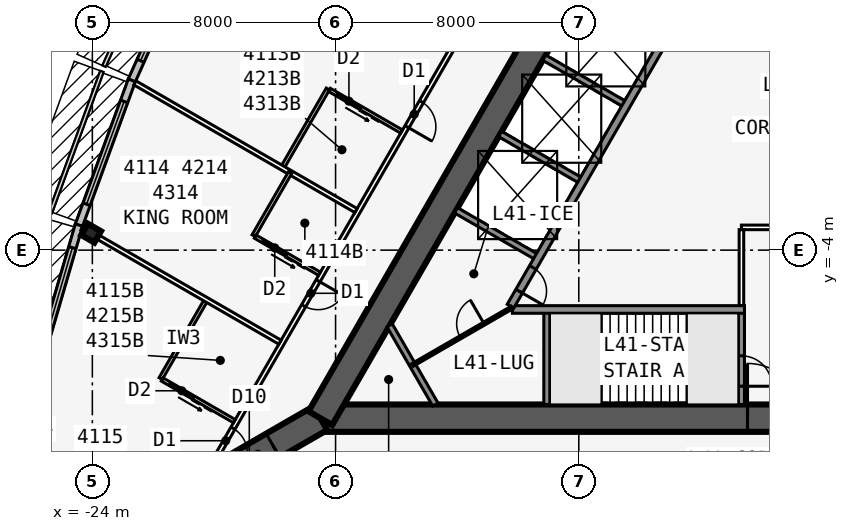
"""IFC4 building model, lengths in metres.
Left out: names, types, materials, properties, quantities, classifications, styles, units other than length and angle.
Written with IfcOpenShell. Run it as: python <this file> out.ifc"""

import sys

from ifc_helpers import new_model, si_unit, direction, frame, frame_2d, origin, origin_2d, place, context, subcontext, project, spatial, rectangle, i_section, extrude, element, fill, save


model = new_model("IFC4")
c1 = context("Model", 3, precision=1e-05, world=origin(), true_north=direction((0.0, 1.0)))
c2 = subcontext(c1, "Body", "Model", "MODEL_VIEW")
j1 = project(units=[si_unit("LENGTHUNIT", "METRE"), si_unit("PLANEANGLEUNIT", "RADIAN")], contexts=[c1])
p1 = place(None, origin())
s1 = spatial("IfcSite", under=j1, at=p1, CompositionType="ELEMENT")
p2 = place(p1, origin())
s2 = spatial("IfcBuilding", under=s1, at=p2, CompositionType="ELEMENT")
p3 = place(p2, frame((0.0, 0.0, 155.5)))
s3 = spatial("IfcBuildingStorey", under=s2, at=p3, CompositionType="ELEMENT", Elevation=155.5)
p4 = place(p3, frame((-16.5, -9.526, 0.0), z_axis=(0.0, 0.0, 1.0), x_axis=(1.0, 0.0, 0.0)))
e1 = element("IfcWall", 1, at=p4, inside=s3, PredefinedType="SHEAR", context=c2, shape_type="SweptSolid", body=[
    extrude(rectangle(XDim=33.0, YDim=0.9, at=frame_2d((16.5, 0.0))), origin(), (0.0, 0.0, 1.0), 3.4),
])
p5 = place(p4, frame((14.05, 0.0, 0.0)))
e2 = element("IfcOpeningElement", 2, at=p5, cuts=e1, PredefinedType="OPENING", context=c2, shape_type="SweptSolid", body=[
    extrude(rectangle(XDim=1.8, YDim=2.13, at=frame_2d((0.9, 1.065))), frame((0.0, 0.46, 0.0), z_axis=(0.0, -1.0, 0.0), x_axis=(1.0, 0.0, 0.0)), (0.0, 0.0, 1.0), 0.92),
])
p6 = place(p3, frame((-10.183, -5.951, 0.0), z_axis=(0.0, 0.0, 1.0), x_axis=(1.0, 0.0, 0.0)))
e3 = element("IfcWall", 3, at=p6, inside=s3, PredefinedType="SOLIDWALL", context=c2, shape_type="SweptSolid", body=[
    extrude(rectangle(XDim=7.633, YDim=0.25, at=frame_2d((3.816, 0.0))), origin(), (0.0, 0.0, 1.0), 3.235),
])
p7 = place(p3, frame((-9.05, -5.951, 0.0), z_axis=(0.0, 0.0, 1.0), x_axis=(0.0, -1.0, 0.0)))
e4 = element("IfcWall", 4, at=p7, inside=s3, PredefinedType="SOLIDWALL", context=c2, shape_type="SweptSolid", body=[
    extrude(rectangle(XDim=3.125, YDim=0.2, at=frame_2d((1.562, 0.0))), origin(), (0.0, 0.0, 1.0), 3.235),
])
p8 = place(p3, frame((-2.65, -5.951, 0.0), z_axis=(0.0, 0.0, 1.0), x_axis=(0.0, -1.0, 0.0)))
e5 = element("IfcWall", 5, at=p8, inside=s3, PredefinedType="SOLIDWALL", context=c2, shape_type="SweptSolid", body=[
    extrude(rectangle(XDim=3.125, YDim=0.2, at=frame_2d((1.562, 0.0))), origin(), (0.0, 0.0, 1.0), 3.235),
])
p9 = place(p8, frame((1.525, 0.0, 0.0)))
e6 = element("IfcOpeningElement", 6, at=p9, cuts=e5, PredefinedType="OPENING", context=c2, shape_type="SweptSolid", body=[
    extrude(rectangle(XDim=1.0, YDim=2.13, at=frame_2d((0.5, 1.065))), frame((0.0, 0.11, 0.0), z_axis=(0.0, -1.0, 0.0), x_axis=(1.0, 0.0, 0.0)), (0.0, 0.0, 1.0), 0.22),
])
p10 = place(p3, frame((0.0, 19.052, 0.0), z_axis=(0.0, 0.0, 1.0), x_axis=(-0.499999749417, -0.866025548458, 0.0)))
e7 = element("IfcWall", 7, at=p10, inside=s3, PredefinedType="SHEAR", context=c2, shape_type="SweptSolid", body=[
    extrude(rectangle(XDim=33.0, YDim=0.9, at=frame_2d((16.5, 0.0))), origin(), (0.0, 0.0, 1.0), 3.4),
])
p11 = place(p10, frame((14.15, 0.0, 0.0)))
e8 = element("IfcOpeningElement", 8, at=p11, cuts=e7, PredefinedType="OPENING", context=c2, shape_type="SweptSolid", body=[
    extrude(rectangle(XDim=1.8, YDim=2.13, at=frame_2d((0.9, 1.065))), frame((0.0, 0.46, 0.0), z_axis=(0.0, -1.0, 0.0), x_axis=(1.0, 0.0, 0.0)), (0.0, 0.0, 1.0), 0.92),
])
p12 = place(p10, frame((12.6, 0.0, 0.0)))
e9 = element("IfcOpeningElement", 9, at=p12, cuts=e7, PredefinedType="OPENING", context=c2, shape_type="SweptSolid", body=[
    extrude(rectangle(XDim=1.0, YDim=2.13, at=frame_2d((0.5, 1.065))), frame((0.0, 0.46, 0.0), z_axis=(0.0, -1.0, 0.0), x_axis=(1.0, 0.0, 0.0)), (0.0, 0.0, 1.0), 0.92),
])
p13 = place(p3, frame((-4.929, 3.365, 0.0), z_axis=(0.0, 0.0, 1.0), x_axis=(-0.499991433582, -0.866030349552, 0.0)))
e10 = element("IfcWall", 10, at=p13, inside=s3, PredefinedType="SOLIDWALL", context=c2, shape_type="SweptSolid", body=[
    extrude(rectangle(XDim=10.633, YDim=0.25, at=frame_2d((5.316, 0.0))), origin(), (0.0, 0.0, 1.0), 3.235),
])
p14 = place(p13, frame((9.164, 0.0, 0.0)))
e11 = element("IfcOpeningElement", 11, at=p14, cuts=e10, PredefinedType="OPENING", context=c2, shape_type="SweptSolid", body=[
    extrude(rectangle(XDim=0.9, YDim=2.13, at=frame_2d((0.45, 1.065))), frame((0.0, 0.135, 0.0), z_axis=(0.0, -1.0, 0.0), x_axis=(1.0, 0.0, 0.0)), (0.0, 0.0, 1.0), 0.27),
])
for number, where, z_axis, x_axis in (
    (12, (-6.429, 0.767, 0.0), (0.0, 0.0, 1.0), (-0.866, 0.5, 0.0)),
    (13, (-7.879, -1.744, 0.0), (0.0, 0.0, 1.0), (-0.866, 0.5, 0.0)),
    (14, (-9.329, -4.256, 0.0), (0.0, 0.0, 1.0), (-0.866, 0.5, 0.0)),
):
    element("IfcWall", number, at=place(p3, frame(where, z_axis=z_axis, x_axis=x_axis)), inside=s3, PredefinedType="SOLIDWALL", context=c2, shape_type="SweptSolid", body=[
        extrude(rectangle(XDim=3.125, YDim=0.2, at=frame_2d((1.562, 0.0))), origin(), (0.0, 0.0, 1.0), 3.235),
    ])
p15 = place(p3, frame((-16.5, -9.526, 0.0), z_axis=(0.0, 0.0, 1.0), x_axis=(-0.866031398331, -0.499989616998, 0.0)))
e15 = element("IfcWall", 15, at=p15, inside=s3, PredefinedType="SHEAR", context=c2, shape_type="SweptSolid", body=[
    extrude(rectangle(XDim=4.746, YDim=0.9, at=frame_2d((2.373, 0.0))), origin(), (0.0, 0.0, 1.0), 3.4),
])
p16 = place(p15, frame((1.8, 0.0, 0.0)))
e16 = element("IfcOpeningElement", 16, at=p16, cuts=e15, PredefinedType="OPENING", context=c2, shape_type="SweptSolid", body=[
    extrude(rectangle(XDim=1.8, YDim=2.13, at=frame_2d((0.9, 1.065))), frame((0.0, 0.46, 0.0), z_axis=(0.0, -1.0, 0.0), x_axis=(1.0, 0.0, 0.0)), (0.0, 0.0, 1.0), 0.92),
])
p17 = place(p3, frame((-24.041, -3.44, 0.0), z_axis=(0.0, 0.0, 1.0), x_axis=(-0.5, -0.866025403784, 0.0)))
e17 = element("IfcColumn", 17, at=p17, inside=s3, PredefinedType="COLUMN", context=c2, shape_type="SweptSolid", body=[
    extrude(i_section(OverallWidth=0.432, OverallDepth=0.498, WebThickness=0.056, FlangeThickness=0.089, at=origin_2d()), origin(), (0.0, 0.0, 1.0), 3.4),
])
p18 = place(p3, frame((-20.659, 6.169, 0.0), z_axis=(0.0, 0.0, 1.0), x_axis=(-0.406832200364, -0.913502906808, 0.0)))
e18 = element("IfcWall", 18, at=p18, inside=s3, PredefinedType="STANDARD", context=c2, shape_type="SweptSolid", body=[
    extrude(rectangle(XDim=5.028, YDim=0.25, at=frame_2d((2.514, 0.0))), origin(), (0.0, 0.0, 1.0), 3.235),
])
p19 = place(p18, frame((0.714, 0.0, 0.45)))
e19 = element("IfcOpeningElement", 19, at=p19, cuts=e18, PredefinedType="OPENING", context=c2, shape_type="SweptSolid", body=[
    extrude(rectangle(XDim=3.6, YDim=2.4, at=frame_2d((1.8, 1.2))), frame((0.0, 0.135, 0.0), z_axis=(0.0, -1.0, 0.0), x_axis=(1.0, 0.0, 0.0)), (0.0, 0.0, 1.0), 0.27),
])
p20 = place(p3, frame((-22.701, 1.584, 0.0), z_axis=(0.0, 0.0, 1.0), x_axis=(-0.343225593282, -0.939252996863, 0.0)))
e20 = element("IfcWall", 20, at=p20, inside=s3, PredefinedType="STANDARD", context=c2, shape_type="SweptSolid", body=[
    extrude(rectangle(XDim=5.076, YDim=0.25, at=frame_2d((2.538, 0.0))), origin(), (0.0, 0.0, 1.0), 3.235),
])
p21 = place(p20, frame((0.738, 0.0, 0.45)))
e21 = element("IfcOpeningElement", 21, at=p21, cuts=e20, PredefinedType="OPENING", context=c2, shape_type="SweptSolid", body=[
    extrude(rectangle(XDim=3.6, YDim=2.4, at=frame_2d((1.8, 1.2))), frame((0.0, 0.135, 0.0), z_axis=(0.0, -1.0, 0.0), x_axis=(1.0, 0.0, 0.0)), (0.0, 0.0, 1.0), 0.27),
])
p22 = place(p3, frame((-24.441, -3.175, 0.0), z_axis=(0.0, 0.0, 1.0), x_axis=(-0.279528287117, -0.960137457191, 0.0)))
e22 = element("IfcWall", 22, at=p22, inside=s3, PredefinedType="STANDARD", context=c2, shape_type="SweptSolid", body=[
    extrude(rectangle(XDim=5.148, YDim=0.25, at=frame_2d((2.574, 0.0))), origin(), (0.0, 0.0, 1.0), 3.235),
])
p23 = place(p22, frame((0.774, 0.0, 0.45)))
e23 = element("IfcOpeningElement", 23, at=p23, cuts=e22, PredefinedType="OPENING", context=c2, shape_type="SweptSolid", body=[
    extrude(rectangle(XDim=3.6, YDim=2.4, at=frame_2d((1.8, 1.2))), frame((0.0, 0.135, 0.0), z_axis=(0.0, -1.0, 0.0), x_axis=(1.0, 0.0, 0.0)), (0.0, 0.0, 1.0), 0.27),
])
p24 = place(p3, frame((-0.5, 22.836, 0.0), z_axis=(0.0, 0.0, 1.0), x_axis=(-0.500001677587, -0.866024435227, 0.0)))
e24 = element("IfcWall", 24, at=p24, inside=s3, PredefinedType="PARTITIONING", context=c2, shape_type="SweptSolid", body=[
    extrude(rectangle(XDim=39.054, YDim=0.15, at=frame_2d((19.527, 0.0))), origin(), (0.0, 0.0, 1.0), 3.235),
])
p25 = place(p24, frame((0.352, 0.0, 0.0)))
e25 = element("IfcOpeningElement", 25, at=p25, cuts=e24, PredefinedType="OPENING", context=c2, shape_type="SweptSolid", body=[
    extrude(rectangle(XDim=0.95, YDim=2.13, at=frame_2d((0.475, 1.065))), frame((0.0, 0.085, 0.0), z_axis=(0.0, -1.0, 0.0), x_axis=(1.0, 0.0, 0.0)), (0.0, 0.0, 1.0), 0.17),
])
p26 = place(p24, frame((5.952, 0.0, 0.0)))
e26 = element("IfcOpeningElement", 26, at=p26, cuts=e24, PredefinedType="OPENING", context=c2, shape_type="SweptSolid", body=[
    extrude(rectangle(XDim=0.95, YDim=2.13, at=frame_2d((0.475, 1.065))), frame((0.0, 0.085, 0.0), z_axis=(0.0, -1.0, 0.0), x_axis=(1.0, 0.0, 0.0)), (0.0, 0.0, 1.0), 0.17),
])
p27 = place(p24, frame((12.752, 0.0, 0.0)))
e27 = element("IfcOpeningElement", 27, at=p27, cuts=e24, PredefinedType="OPENING", context=c2, shape_type="SweptSolid", body=[
    extrude(rectangle(XDim=0.95, YDim=2.13, at=frame_2d((0.475, 1.065))), frame((0.0, 0.085, 0.0), z_axis=(0.0, -1.0, 0.0), x_axis=(1.0, 0.0, 0.0)), (0.0, 0.0, 1.0), 0.17),
])
p28 = place(p24, frame((25.352, 0.0, 0.0)))
e28 = element("IfcOpeningElement", 28, at=p28, cuts=e24, PredefinedType="OPENING", context=c2, shape_type="SweptSolid", body=[
    extrude(rectangle(XDim=0.95, YDim=2.13, at=frame_2d((0.475, 1.065))), frame((0.0, 0.085, 0.0), z_axis=(0.0, -1.0, 0.0), x_axis=(1.0, 0.0, 0.0)), (0.0, 0.0, 1.0), 0.17),
])
p29 = place(p24, frame((32.152, 0.0, 0.0)))
e29 = element("IfcOpeningElement", 29, at=p29, cuts=e24, PredefinedType="OPENING", context=c2, shape_type="SweptSolid", body=[
    extrude(rectangle(XDim=0.95, YDim=2.13, at=frame_2d((0.475, 1.065))), frame((0.0, 0.085, 0.0), z_axis=(0.0, -1.0, 0.0), x_axis=(1.0, 0.0, 0.0)), (0.0, 0.0, 1.0), 0.17),
])
p30 = place(p24, frame((37.752, 0.0, 0.0)))
e30 = element("IfcOpeningElement", 30, at=p30, cuts=e24, PredefinedType="OPENING", context=c2, shape_type="SweptSolid", body=[
    extrude(rectangle(XDim=0.95, YDim=2.13, at=frame_2d((0.475, 1.065))), frame((0.0, 0.085, 0.0), z_axis=(0.0, -1.0, 0.0), x_axis=(1.0, 0.0, 0.0)), (0.0, 0.0, 1.0), 0.17),
])
p31 = place(p3, frame((-15.329, -2.697, 0.0), z_axis=(0.0, 0.0, 1.0), x_axis=(-0.866024316602, 0.50000188305, 0.0)))
e31 = element("IfcWall", 31, at=p31, inside=s3, PredefinedType="PARTITIONING", context=c2, shape_type="SweptSolid", body=[
    extrude(rectangle(XDim=8.395, YDim=0.15, at=frame_2d((4.198, 0.0))), origin(), (0.0, 0.0, 1.0), 2.389),
])
p32 = place(p3, frame((-17.829, -7.027, 0.0), z_axis=(0.0, 0.0, 1.0), x_axis=(-0.866029804378, 0.499992377871, 0.0)))
e32 = element("IfcWall", 32, at=p32, inside=s3, PredefinedType="PARTITIONING", context=c2, shape_type="SweptSolid", body=[
    extrude(rectangle(XDim=7.516, YDim=0.15, at=frame_2d((3.758, 0.0))), origin(), (0.0, 0.0, 1.0), 2.389),
])
p33 = place(p3, frame((-16.253, 1.301, 0.0), z_axis=(0.0, 0.0, 1.0), x_axis=(-0.499990139034, -0.866031096941, 0.0)))
e33 = element("IfcWall", 33, at=p33, inside=s3, PredefinedType="PLUMBINGWALL", context=c2, shape_type="SweptSolid", body=[
    extrude(rectangle(XDim=3.0, YDim=0.12, at=frame_2d((1.5, 0.0))), origin(), (0.0, 0.0, 1.0), 3.235),
])
p34 = place(p3, frame((-13.829, -0.099, 0.0), z_axis=(0.0, 0.0, 1.0), x_axis=(-0.865997131366, 0.500048966069, 0.0)))
e34 = element("IfcWall", 34, at=p34, inside=s3, PredefinedType="PLUMBINGWALL", context=c2, shape_type="SweptSolid", body=[
    extrude(rectangle(XDim=2.74, YDim=0.12, at=frame_2d((1.37, 0.0))), origin(), (0.0, 0.0, 1.0), 3.235),
])
p35 = place(p34, frame((1.55, 0.0, 0.0)))
e35 = element("IfcOpeningElement", 35, at=p35, cuts=e34, PredefinedType="OPENING", context=c2, shape_type="SweptSolid", body=[
    extrude(rectangle(XDim=0.9, YDim=2.13, at=frame_2d((0.45, 1.065))), frame((0.0, 0.07, 0.0), z_axis=(0.0, -1.0, 0.0), x_axis=(1.0, 0.0, 0.0)), (0.0, 0.0, 1.0), 0.14),
])
p36 = place(p3, frame((-17.493, -1.447, 0.0), z_axis=(0.0, 0.0, 1.0), x_axis=(-0.500033551112, -0.866006032174, 0.0)))
e36 = element("IfcWall", 36, at=p36, inside=s3, PredefinedType="PLUMBINGWALL", context=c2, shape_type="SweptSolid", body=[
    extrude(rectangle(XDim=2.4, YDim=0.12, at=frame_2d((1.2, 0.0))), origin(), (0.0, 0.0, 1.0), 3.235),
])
p37 = place(p3, frame((-16.529, -4.776, 0.0), z_axis=(0.0, 0.0, 1.0), x_axis=(-0.866023955769, 0.500002508028, 0.0)))
e37 = element("IfcWall", 37, at=p37, inside=s3, PredefinedType="PLUMBINGWALL", context=c2, shape_type="SweptSolid", body=[
    extrude(rectangle(XDim=2.44, YDim=0.12, at=frame_2d((1.22, 0.0))), origin(), (0.0, 0.0, 1.0), 3.235),
])
p38 = place(p37, frame((1.25, 0.0, 0.0)))
e38 = element("IfcOpeningElement", 38, at=p38, cuts=e37, PredefinedType="OPENING", context=c2, shape_type="SweptSolid", body=[
    extrude(rectangle(XDim=0.9, YDim=2.13, at=frame_2d((0.45, 1.065))), frame((0.0, 0.07, 0.0), z_axis=(0.0, -1.0, 0.0), x_axis=(1.0, 0.0, 0.0)), (0.0, 0.0, 1.0), 0.14),
])
p39 = place(p3, frame((-20.253, -5.627, 0.0), z_axis=(0.0, 0.0, 1.0), x_axis=(-0.499990139034, -0.866031096941, 0.0)))
e39 = element("IfcWall", 39, at=p39, inside=s3, PredefinedType="PLUMBINGWALL", context=c2, shape_type="SweptSolid", body=[
    extrude(rectangle(XDim=3.0, YDim=0.12, at=frame_2d((1.5, 0.0))), origin(), (0.0, 0.0, 1.0), 3.235),
])
p40 = place(p3, frame((-19.329, -9.625, 0.0), z_axis=(0.0, 0.0, 1.0), x_axis=(-0.866035715982, 0.499982138324, 0.0)))
e40 = element("IfcWall", 40, at=p40, inside=s3, PredefinedType="PLUMBINGWALL", context=c2, shape_type="SweptSolid", body=[
    extrude(rectangle(XDim=2.74, YDim=0.12, at=frame_2d((1.37, 0.0))), origin(), (0.0, 0.0, 1.0), 3.235),
])
p41 = place(p40, frame((1.55, 0.0, 0.0)))
e41 = element("IfcOpeningElement", 41, at=p41, cuts=e40, PredefinedType="OPENING", context=c2, shape_type="SweptSolid", body=[
    extrude(rectangle(XDim=0.9, YDim=2.13, at=frame_2d((0.45, 1.065))), frame((0.0, 0.07, 0.0), z_axis=(0.0, -1.0, 0.0), x_axis=(1.0, 0.0, 0.0)), (0.0, 0.0, 1.0), 0.14),
])
p42 = place(p3, frame((-2.65, -3.251, 0.0), z_axis=(0.0, 0.0, 1.0), x_axis=(1.0, 0.0, 0.0)))
e42 = element("IfcWall", 42, at=p42, inside=s3, PredefinedType="PARTITIONING", context=c2, shape_type="SweptSolid", body=[
    extrude(rectangle(XDim=8.35, YDim=0.15, at=frame_2d((4.175, 0.0))), origin(), (0.0, 0.0, 1.0), 3.235),
])
p43 = place(p3, frame((-2.65, -5.826, 0.0), z_axis=(0.0, 0.0, 1.0), x_axis=(0.0, 1.0, 0.0)))
e43 = element("IfcWall", 43, at=p43, inside=s3, PredefinedType="PARTITIONING", context=c2, shape_type="SweptSolid", body=[
    extrude(rectangle(XDim=2.5, YDim=0.15, at=frame_2d((1.25, 0.0))), origin(), (0.0, 0.0, 1.0), 3.235),
])
p44 = place(p3, frame((-12.719, -9.076, 0.0), z_axis=(0.0, 0.0, 1.0), x_axis=(-0.499952404951, 0.866052881055, 0.0)))
e44 = element("IfcWall", 44, at=p44, inside=s3, PredefinedType="SOLIDWALL", context=c2, shape_type="SweptSolid", body=[
    extrude(rectangle(XDim=3.002, YDim=0.2, at=frame_2d((1.501, 0.0))), origin(), (0.0, 0.0, 1.0), 3.235),
])
p45 = place(p3, frame((-13.469, -7.776, 0.0), z_axis=(0.0, 0.0, 1.0), x_axis=(0.866021898093, 0.500006071987, 0.0)))
e45 = element("IfcWall", 45, at=p45, inside=s3, PredefinedType="PARTITIONING", context=c2, shape_type="SweptSolid", body=[
    extrude(rectangle(XDim=3.775, YDim=0.1, at=frame_2d((1.888, 0.0))), origin(), (0.0, 0.0, 1.0), 3.235),
])
p46 = place(p45, frame((1.815, 0.0, 0.0)))
e46 = element("IfcOpeningElement", 46, at=p46, cuts=e45, PredefinedType="OPENING", context=c2, shape_type="SweptSolid", body=[
    extrude(rectangle(XDim=0.9, YDim=2.13, at=frame_2d((0.45, 1.065))), frame((0.0, 0.06, 0.0), z_axis=(0.0, -1.0, 0.0), x_axis=(1.0, 0.0, 0.0)), (0.0, 0.0, 1.0), 0.12),
])
p47 = place(p3, frame((-7.247, -7.576, 0.0), z_axis=(0.0, 0.0, 1.0), x_axis=(1.0, 0.0, 0.0)))
e47 = element("IfcWall", 47, at=p47, inside=s3, PredefinedType="SOLIDWALL", context=c2, shape_type="SweptSolid", body=[
    extrude(rectangle(XDim=2.794, YDim=0.1, at=frame_2d((1.397, 0.0))), origin(), (0.0, 0.0, 1.0), 3.4),
])
p48 = place(p19, origin())
e48 = element("IfcWindow", 48, at=p48, inside=s3, PartitioningType="SINGLE_PANEL", PredefinedType="WINDOW", context=c2, shape_type="SweptSolid", body=[
    extrude(rectangle(XDim=3.6, YDim=2.4, at=frame_2d((1.8, 1.2))), frame((0.0, 0.03, 0.0), z_axis=(0.0, -1.0, 0.0), x_axis=(1.0, 0.0, 0.0)), (0.0, 0.0, 1.0), 0.06),
])
fill(e19, e48)
p49 = place(p21, origin())
e49 = element("IfcWindow", 49, at=p49, inside=s3, PartitioningType="SINGLE_PANEL", PredefinedType="WINDOW", context=c2, shape_type="SweptSolid", body=[
    extrude(rectangle(XDim=3.6, YDim=2.4, at=frame_2d((1.8, 1.2))), frame((0.0, 0.03, 0.0), z_axis=(0.0, -1.0, 0.0), x_axis=(1.0, 0.0, 0.0)), (0.0, 0.0, 1.0), 0.06),
])
fill(e21, e49)
p50 = place(p23, origin())
e50 = element("IfcWindow", 50, at=p50, inside=s3, PartitioningType="SINGLE_PANEL", PredefinedType="WINDOW", context=c2, shape_type="SweptSolid", body=[
    extrude(rectangle(XDim=3.6, YDim=2.4, at=frame_2d((1.8, 1.2))), frame((0.0, 0.03, 0.0), z_axis=(0.0, -1.0, 0.0), x_axis=(1.0, 0.0, 0.0)), (0.0, 0.0, 1.0), 0.06),
])
fill(e23, e50)
p51 = place(p35, origin())
e51 = element("IfcDoor", 51, at=p51, inside=s3, OperationType="SLIDING_TO_LEFT", PredefinedType="DOOR", context=c2, shape_type="SweptSolid", body=[
    extrude(rectangle(XDim=0.9, YDim=2.13, at=frame_2d((0.45, 1.065))), frame((0.0, 0.025, 0.0), z_axis=(0.0, -1.0, 0.0), x_axis=(1.0, 0.0, 0.0)), (0.0, 0.0, 1.0), 0.05),
])
fill(e35, e51)
p52 = place(p28, origin())
e52 = element("IfcDoor", 52, at=p52, inside=s3, OperationType="SINGLE_SWING_RIGHT", PredefinedType="DOOR", context=c2, shape_type="SweptSolid", body=[
    extrude(rectangle(XDim=0.95, YDim=2.13, at=frame_2d((0.475, 1.065))), frame((0.0, 0.025, 0.0), z_axis=(0.0, -1.0, 0.0), x_axis=(1.0, 0.0, 0.0)), (0.0, 0.0, 1.0), 0.05),
])
fill(e28, e52)
p53 = place(p38, origin())
e53 = element("IfcDoor", 53, at=p53, inside=s3, OperationType="SLIDING_TO_LEFT", PredefinedType="DOOR", context=c2, shape_type="SweptSolid", body=[
    extrude(rectangle(XDim=0.9, YDim=2.13, at=frame_2d((0.45, 1.065))), frame((0.0, 0.025, 0.0), z_axis=(0.0, -1.0, 0.0), x_axis=(1.0, 0.0, 0.0)), (0.0, 0.0, 1.0), 0.05),
])
fill(e38, e53)
p54 = place(p29, origin())
e54 = element("IfcDoor", 54, at=p54, inside=s3, OperationType="SINGLE_SWING_LEFT", PredefinedType="DOOR", context=c2, shape_type="SweptSolid", body=[
    extrude(rectangle(XDim=0.95, YDim=2.13, at=frame_2d((0.475, 1.065))), frame((0.0, 0.025, 0.0), z_axis=(0.0, -1.0, 0.0), x_axis=(1.0, 0.0, 0.0)), (0.0, 0.0, 1.0), 0.05),
])
fill(e29, e54)
p55 = place(p41, origin())
e55 = element("IfcDoor", 55, at=p55, inside=s3, OperationType="SLIDING_TO_LEFT", PredefinedType="DOOR", context=c2, shape_type="SweptSolid", body=[
    extrude(rectangle(XDim=0.9, YDim=2.13, at=frame_2d((0.45, 1.065))), frame((0.0, 0.025, 0.0), z_axis=(0.0, -1.0, 0.0), x_axis=(1.0, 0.0, 0.0)), (0.0, 0.0, 1.0), 0.05),
])
fill(e41, e55)
p56 = place(p30, origin())
e56 = element("IfcDoor", 56, at=p56, inside=s3, OperationType="SINGLE_SWING_RIGHT", PredefinedType="DOOR", context=c2, shape_type="SweptSolid", body=[
    extrude(rectangle(XDim=0.95, YDim=2.13, at=frame_2d((0.475, 1.065))), frame((0.0, 0.025, 0.0), z_axis=(0.0, -1.0, 0.0), x_axis=(1.0, 0.0, 0.0)), (0.0, 0.0, 1.0), 0.05),
])
fill(e30, e56)
p57 = place(p5, origin())
e57 = element("IfcDoor", 57, at=p57, inside=s3, OperationType="DOUBLE_DOOR_SINGLE_SWING", PredefinedType="DOOR", context=c2, shape_type="SweptSolid", body=[
    extrude(rectangle(XDim=1.8, YDim=2.13, at=frame_2d((0.9, 1.065))), frame((0.0, 0.025, 0.0), z_axis=(0.0, -1.0, 0.0), x_axis=(1.0, 0.0, 0.0)), (0.0, 0.0, 1.0), 0.05),
])
fill(e2, e57)
p58 = place(p9, origin())
e58 = element("IfcDoor", 58, at=p58, inside=s3, OperationType="SINGLE_SWING_RIGHT", PredefinedType="DOOR", context=c2, shape_type="SweptSolid", body=[
    extrude(rectangle(XDim=1.0, YDim=2.13, at=frame_2d((0.5, 1.065))), frame((0.0, 0.025, 0.0), z_axis=(0.0, -1.0, 0.0), x_axis=(1.0, 0.0, 0.0)), (0.0, 0.0, 1.0), 0.05),
])
fill(e6, e58)
p59 = place(p16, origin())
e59 = element("IfcDoor", 59, at=p59, inside=s3, OperationType="DOUBLE_DOOR_DOUBLE_SWING", PredefinedType="DOOR", context=c2, shape_type="SweptSolid", body=[
    extrude(rectangle(XDim=1.8, YDim=2.13, at=frame_2d((0.9, 1.065))), frame((0.0, 0.025, 0.0), z_axis=(0.0, -1.0, 0.0), x_axis=(1.0, 0.0, 0.0)), (0.0, 0.0, 1.0), 0.05),
])
fill(e16, e59)
p60 = place(p14, origin())
e60 = element("IfcDoor", 60, at=p60, inside=s3, OperationType="SINGLE_SWING_RIGHT", PredefinedType="DOOR", context=c2, shape_type="SweptSolid", body=[
    extrude(rectangle(XDim=0.9, YDim=2.13, at=frame_2d((0.45, 1.065))), frame((0.0, 0.025, 0.0), z_axis=(0.0, -1.0, 0.0), x_axis=(1.0, 0.0, 0.0)), (0.0, 0.0, 1.0), 0.05),
])
fill(e11, e60)
p61 = place(p46, origin())
e61 = element("IfcDoor", 61, at=p61, inside=s3, OperationType="SINGLE_SWING_RIGHT", PredefinedType="DOOR", context=c2, shape_type="SweptSolid", body=[
    extrude(rectangle(XDim=0.9, YDim=2.13, at=frame_2d((0.45, 1.065))), frame((0.0, 0.025, 0.0), z_axis=(0.0, -1.0, 0.0), x_axis=(1.0, 0.0, 0.0)), (0.0, 0.0, 1.0), 0.05),
])
fill(e46, e61)
save(model, sys.argv[1])
